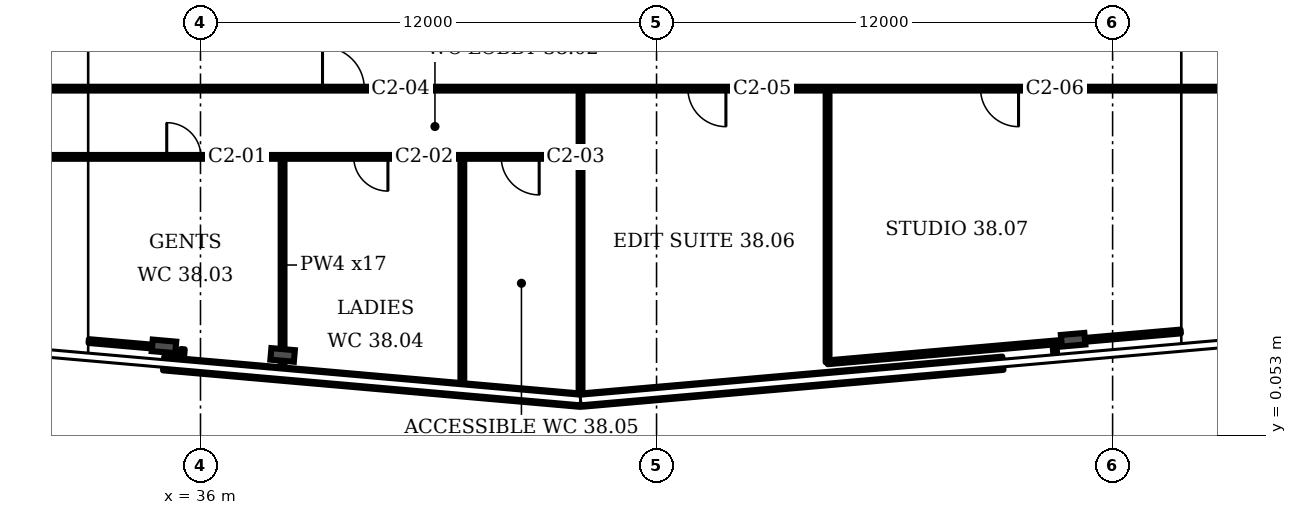
"""IFC4 building model, lengths in metres.
Left out: names, types, materials, properties, quantities, classifications, styles, units other than length and angle.
Written with IfcOpenShell. Run it as: python <this file> out.ifc"""

import sys

from ifc_helpers import new_model, si_unit, direction, frame, frame_2d, origin, origin_2d, place, context, subcontext, project, spatial, rectangle, i_section, extrude, element, fill, save


model = new_model("IFC4")
c1 = context("Model", 3, precision=1e-05, world=origin(), true_north=direction((0.0, 1.0)))
c2 = subcontext(c1, "Body", "Model", "MODEL_VIEW")
j1 = project(units=[si_unit("LENGTHUNIT", "METRE"), si_unit("PLANEANGLEUNIT", "RADIAN")], contexts=[c1])
p1 = place(None, origin())
s1 = spatial("IfcSite", under=j1, at=p1, CompositionType="ELEMENT")
p2 = place(p1, origin())
s2 = spatial("IfcBuilding", under=s1, at=p2, CompositionType="ELEMENT")
p3 = place(p2, frame((0.0, 0.0, 159.1)))
s3 = spatial("IfcBuildingStorey", under=s2, at=p3, CompositionType="ELEMENT", Elevation=159.1)
for number, where, z_axis, x_axis in (
    (1, (35.039, 2.399, 0.0), (0.0, 0.0, 1.0), (-0.087, -0.996, 0.0)),
    (2, (38.161, 2.174, 0.0), (0.0, 0.0, 1.0), (-0.087, -0.996, 0.0)),
    (3, (58.961, 2.573, 0.0), (0.0, 0.0, 1.0), (0.087, -0.996, 0.0)),
):
    element("IfcColumn", number, at=place(p3, frame(where, z_axis=z_axis, x_axis=x_axis)), inside=s3, PredefinedType="COLUMN", context=c2, shape_type="SweptSolid", body=[
        extrude(i_section(OverallWidth=0.305, OverallDepth=0.62, WebThickness=0.021, FlangeThickness=0.04, FilletRadius=0.027, at=origin_2d()), origin(), (0.0, 0.0, 1.0), 3.6),
    ])
p4 = place(p3, frame((35.03, 1.943, 0.0), z_axis=(0.0, 0.0, 1.0), x_axis=(0.996199, -0.08714, 0.0)))
e4 = element("IfcWall", 4, at=p4, inside=s3, PredefinedType="SOLIDWALL", context=c2, shape_type="SweptSolid", body=[
    extrude(rectangle(XDim=11.028, YDim=0.35, at=frame_2d((5.514, 0.0))), origin(), (0.0, 0.0, 1.0), 1.0),
])
p5 = place(p3, frame((46.045, 0.987, 0.0), z_axis=(0.0, 0.0, 1.0), x_axis=(0.996193, 0.087171, 0.0)))
e5 = element("IfcWall", 5, at=p5, inside=s3, PredefinedType="SOLIDWALL", context=c2, shape_type="SweptSolid", body=[
    extrude(rectangle(XDim=11.11, YDim=0.35, at=frame_2d((5.555, 0.0))), origin(), (0.0, 0.0, 1.0), 1.0),
])
p6 = place(p3, frame((31.714, 7.385, 0.0), z_axis=(0.0, 0.0, 1.0), x_axis=(1.0, 0.0, 0.0)))
e6 = element("IfcWall", 6, at=p6, inside=s3, PredefinedType="PARTITIONING", context=c2, shape_type="SweptSolid", body=[
    extrude(rectangle(XDim=14.286, YDim=0.1, at=frame_2d((7.143, 0.0))), origin(), (0.0, 0.0, 1.0), 3.2),
])
p7 = place(p6, frame((3.398, 0.0, 0.0)))
e7 = element("IfcOpeningElement", 7, at=p7, cuts=e6, PredefinedType="OPENING", context=c2, shape_type="SweptSolid", body=[
    extrude(rectangle(XDim=0.9, YDim=2.1, at=frame_2d((0.45, 1.05))), frame((0.0, 0.06, 0.0), z_axis=(0.0, -1.0, 0.0), x_axis=(1.0, 0.0, 0.0)), (0.0, 0.0, 1.0), 0.12),
])
p8 = place(p6, frame((8.318, 0.0, 0.0)))
e8 = element("IfcOpeningElement", 8, at=p8, cuts=e6, PredefinedType="OPENING", context=c2, shape_type="SweptSolid", body=[
    extrude(rectangle(XDim=0.9, YDim=2.1, at=frame_2d((0.45, 1.05))), frame((0.0, 0.06, 0.0), z_axis=(0.0, -1.0, 0.0), x_axis=(1.0, 0.0, 0.0)), (0.0, 0.0, 1.0), 0.12),
])
p9 = place(p6, frame((12.198, 0.0, 0.0)))
e9 = element("IfcOpeningElement", 9, at=p9, cuts=e6, PredefinedType="OPENING", context=c2, shape_type="SweptSolid", body=[
    extrude(rectangle(XDim=1.0, YDim=2.1, at=frame_2d((0.5, 1.05))), frame((0.0, 0.06, 0.0), z_axis=(0.0, -1.0, 0.0), x_axis=(1.0, 0.0, 0.0)), (0.0, 0.0, 1.0), 0.12),
])
p10 = place(p3, frame((31.714, 9.18, 0.0), z_axis=(0.0, 0.0, 1.0), x_axis=(1.0, 0.0, 0.0)))
e10 = element("IfcWall", 10, at=p10, inside=s3, PredefinedType="PARTITIONING", context=c2, shape_type="SweptSolid", body=[
    extrude(rectangle(XDim=32.072, YDim=0.1, at=frame_2d((16.036, 0.0))), origin(), (0.0, 0.0, 1.0), 3.2),
])
p11 = place(p10, frame((7.497, 0.0, 0.0)))
e11 = element("IfcOpeningElement", 11, at=p11, cuts=e10, PredefinedType="OPENING", context=c2, shape_type="SweptSolid", body=[
    extrude(rectangle(XDim=1.1, YDim=2.1, at=frame_2d((0.55, 1.05))), frame((0.0, 0.06, 0.0), z_axis=(0.0, -1.0, 0.0), x_axis=(1.0, 0.0, 0.0)), (0.0, 0.0, 1.0), 0.12),
])
p12 = place(p10, frame((17.111, 0.0, 0.0)))
e12 = element("IfcOpeningElement", 12, at=p12, cuts=e10, PredefinedType="OPENING", context=c2, shape_type="SweptSolid", body=[
    extrude(rectangle(XDim=1.0, YDim=2.1, at=frame_2d((0.5, 1.05))), frame((0.0, 0.06, 0.0), z_axis=(0.0, -1.0, 0.0), x_axis=(1.0, 0.0, 0.0)), (0.0, 0.0, 1.0), 0.12),
])
p13 = place(p10, frame((24.811, 0.0, 0.0)))
e13 = element("IfcOpeningElement", 13, at=p13, cuts=e10, PredefinedType="OPENING", context=c2, shape_type="SweptSolid", body=[
    extrude(rectangle(XDim=1.0, YDim=2.1, at=frame_2d((0.5, 1.05))), frame((0.0, 0.06, 0.0), z_axis=(0.0, -1.0, 0.0), x_axis=(1.0, 0.0, 0.0)), (0.0, 0.0, 1.0), 0.12),
])
p14 = place(p3, frame((35.0, 2.37, 0.0), z_axis=(0.0, 0.0, 1.0), x_axis=(-0.996265, 0.086343, 0.0)))
e14 = element("IfcWall", 14, at=p14, inside=s3, PredefinedType="PARTITIONING", context=c2, shape_type="SweptSolid", body=[
    extrude(rectangle(XDim=1.948, YDim=0.1, at=frame_2d((0.974, 0.0))), origin(), (0.0, 0.0, 1.0), 2.58),
])
p15 = place(p3, frame((35.502, 1.927, 0.0), z_axis=(0.0, 0.0, 1.0), x_axis=(0.083045, 0.996542, 0.0)))
e15 = element("IfcWall", 15, at=p15, inside=s3, PredefinedType="PARTITIONING", context=c2, shape_type="SweptSolid", body=[
    extrude(rectangle(XDim=0.4, YDim=0.1, at=frame_2d((0.2, 0.0))), origin(), (0.0, 0.0, 1.0), 3.2),
])
p16 = place(p3, frame((38.16, 1.694, 0.0), z_axis=(0.0, 0.0, 1.0), x_axis=(0.0, 1.0, 0.0)))
e16 = element("IfcWall", 16, at=p16, inside=s3, PredefinedType="PARTITIONING", context=c2, shape_type="SweptSolid", body=[
    extrude(rectangle(XDim=5.691, YDim=0.1, at=frame_2d((2.846, 0.0))), origin(), (0.0, 0.0, 1.0), 3.2),
])
p17 = place(p3, frame((42.89, 1.28, 0.0), z_axis=(0.0, 0.0, 1.0), x_axis=(0.0, 1.0, 0.0)))
e17 = element("IfcWall", 17, at=p17, inside=s3, PredefinedType="PARTITIONING", context=c2, shape_type="SweptSolid", body=[
    extrude(rectangle(XDim=6.105, YDim=0.1, at=frame_2d((3.052, 0.0))), origin(), (0.0, 0.0, 1.0), 3.2),
])
p18 = place(p3, frame((46.0, 1.008, 0.0), z_axis=(0.0, 0.0, 1.0), x_axis=(0.0, 1.0, 0.0)))
e18 = element("IfcWall", 18, at=p18, inside=s3, PredefinedType="PARTITIONING", context=c2, shape_type="SweptSolid", body=[
    extrude(rectangle(XDim=8.172, YDim=0.1, at=frame_2d((4.086, 0.0))), origin(), (0.0, 0.0, 1.0), 3.2),
])
p19 = place(p3, frame((52.5, 1.98, 0.0), z_axis=(0.0, 0.0, 1.0), x_axis=(0.0, 1.0, 0.0)))
e19 = element("IfcWall", 19, at=p19, inside=s3, PredefinedType="PARTITIONING", context=c2, shape_type="SweptSolid", body=[
    extrude(rectangle(XDim=7.205, YDim=0.1, at=frame_2d((3.603, 0.0))), origin(), (0.0, 0.0, 1.0), 3.2),
])
p20 = place(p3, frame((52.5, 1.98, 0.0), z_axis=(0.0, 0.0, 1.0), x_axis=(0.99622, 0.086844, 0.0)))
e20 = element("IfcWall", 20, at=p20, inside=s3, PredefinedType="PARTITIONING", context=c2, shape_type="SweptSolid", body=[
    extrude(rectangle(XDim=9.328, YDim=0.1, at=frame_2d((4.664, 0.0))), origin(), (0.0, 0.0, 1.0), 2.58),
])
p21 = place(p3, frame((58.498, 2.102, 0.0), z_axis=(0.0, 0.0, 1.0), x_axis=(-0.083045, 0.996542, 0.0)))
e21 = element("IfcWall", 21, at=p21, inside=s3, PredefinedType="PARTITIONING", context=c2, shape_type="SweptSolid", body=[
    extrude(rectangle(XDim=0.4, YDim=0.1, at=frame_2d((0.2, 0.0))), origin(), (0.0, 0.0, 1.0), 3.2),
])
p22 = place(p7, origin())
e22 = element("IfcDoor", 22, at=p22, inside=s3, OperationType="SINGLE_SWING_LEFT", PredefinedType="DOOR", context=c2, shape_type="SweptSolid", body=[
    extrude(rectangle(XDim=0.9, YDim=2.1, at=frame_2d((0.45, 1.05))), frame((0.0, 0.025, 0.0), z_axis=(0.0, -1.0, 0.0), x_axis=(1.0, 0.0, 0.0)), (0.0, 0.0, 1.0), 0.05),
])
fill(e7, e22)
p23 = place(p8, origin())
e23 = element("IfcDoor", 23, at=p23, inside=s3, OperationType="SINGLE_SWING_RIGHT", PredefinedType="DOOR", context=c2, shape_type="SweptSolid", body=[
    extrude(rectangle(XDim=0.9, YDim=2.1, at=frame_2d((0.45, 1.05))), frame((0.0, 0.025, 0.0), z_axis=(0.0, -1.0, 0.0), x_axis=(1.0, 0.0, 0.0)), (0.0, 0.0, 1.0), 0.05),
])
fill(e8, e23)
p24 = place(p9, origin())
e24 = element("IfcDoor", 24, at=p24, inside=s3, OperationType="SINGLE_SWING_RIGHT", PredefinedType="DOOR", context=c2, shape_type="SweptSolid", body=[
    extrude(rectangle(XDim=1.0, YDim=2.1, at=frame_2d((0.5, 1.05))), frame((0.0, 0.025, 0.0), z_axis=(0.0, -1.0, 0.0), x_axis=(1.0, 0.0, 0.0)), (0.0, 0.0, 1.0), 0.05),
])
fill(e9, e24)
p25 = place(p11, origin())
e25 = element("IfcDoor", 25, at=p25, inside=s3, OperationType="SINGLE_SWING_LEFT", PredefinedType="DOOR", context=c2, shape_type="SweptSolid", body=[
    extrude(rectangle(XDim=1.1, YDim=2.1, at=frame_2d((0.55, 1.05))), frame((0.0, 0.025, 0.0), z_axis=(0.0, -1.0, 0.0), x_axis=(1.0, 0.0, 0.0)), (0.0, 0.0, 1.0), 0.05),
])
fill(e11, e25)
p26 = place(p12, origin())
e26 = element("IfcDoor", 26, at=p26, inside=s3, OperationType="SINGLE_SWING_RIGHT", PredefinedType="DOOR", context=c2, shape_type="SweptSolid", body=[
    extrude(rectangle(XDim=1.0, YDim=2.1, at=frame_2d((0.5, 1.05))), frame((0.0, 0.025, 0.0), z_axis=(0.0, -1.0, 0.0), x_axis=(1.0, 0.0, 0.0)), (0.0, 0.0, 1.0), 0.05),
])
fill(e12, e26)
p27 = place(p13, origin())
e27 = element("IfcDoor", 27, at=p27, inside=s3, OperationType="SINGLE_SWING_RIGHT", PredefinedType="DOOR", context=c2, shape_type="SweptSolid", body=[
    extrude(rectangle(XDim=1.0, YDim=2.1, at=frame_2d((0.5, 1.05))), frame((0.0, 0.025, 0.0), z_axis=(0.0, -1.0, 0.0), x_axis=(1.0, 0.0, 0.0)), (0.0, 0.0, 1.0), 0.05),
])
fill(e13, e27)
save(model, sys.argv[1])
